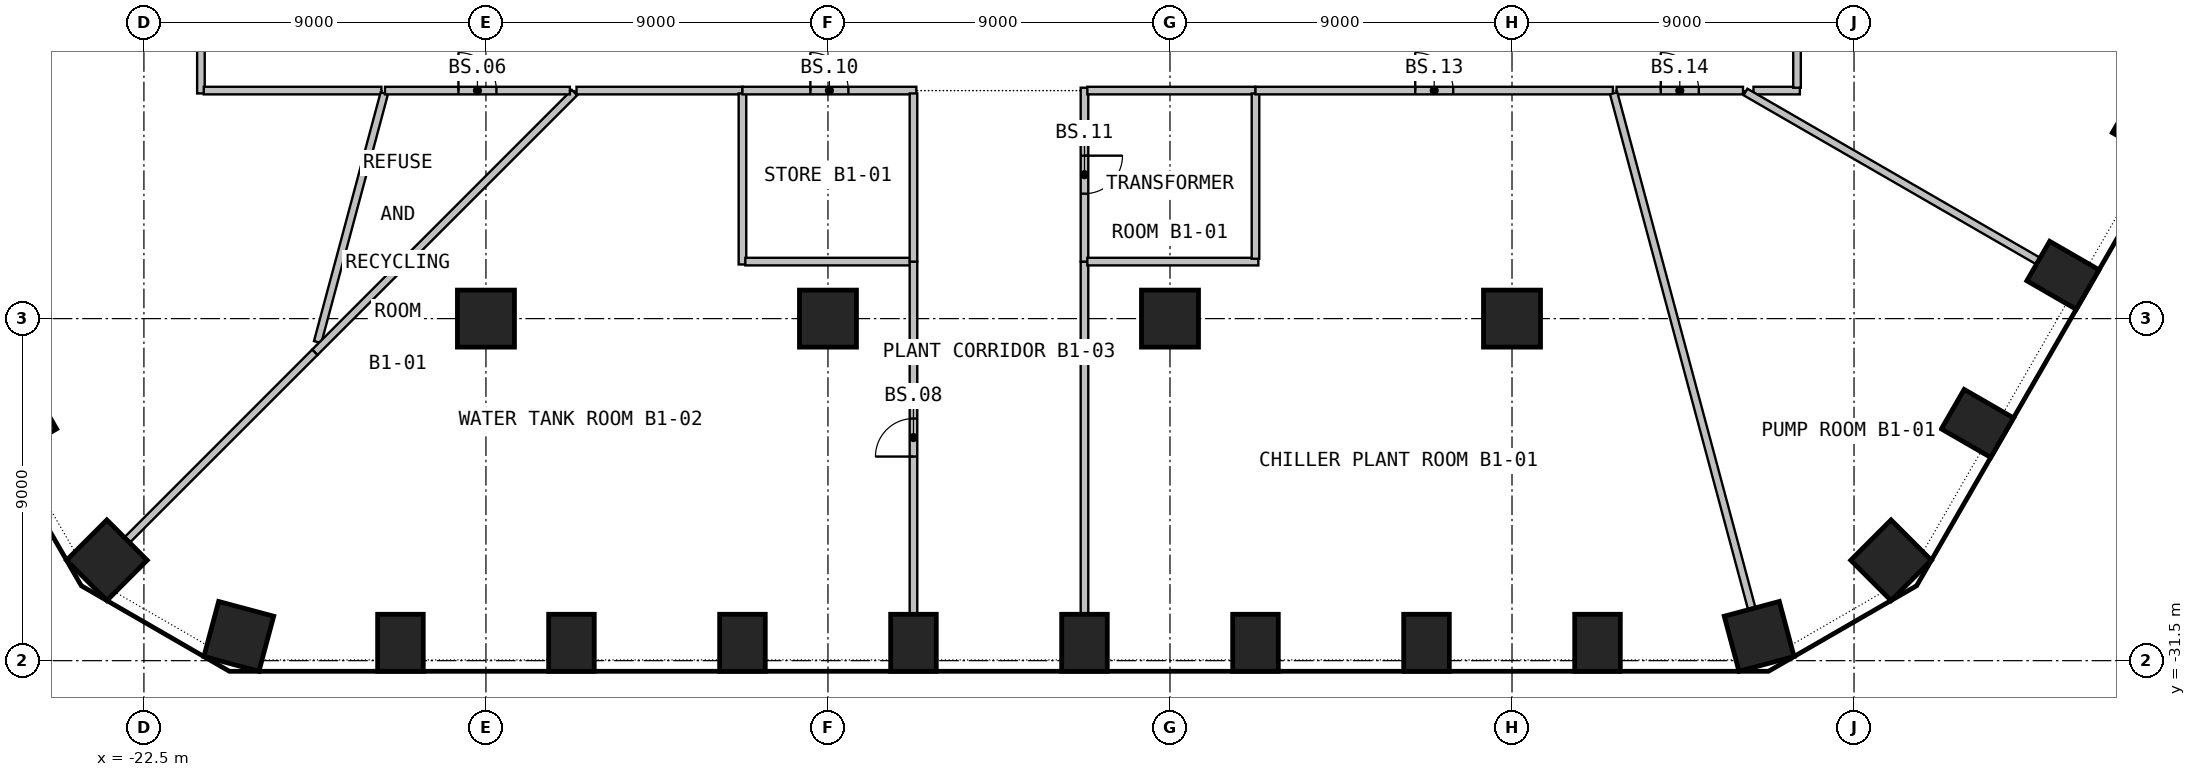
"""IFC4 building model, lengths in metres.
Left out: names, types, materials, properties, quantities, classifications, styles, units other than length and angle.
Written with IfcOpenShell. Run it as: python <this file> out.ifc"""

import sys

from ifc_helpers import new_model, si_unit, direction, frame, frame_2d, origin, origin_2d, place, context, subcontext, project, spatial, rectangle, circle, extrude, element, fill, save


model = new_model("IFC4")
c1 = context("Model", 3, precision=1e-05, world=origin(), true_north=direction((0.0, 1.0)))
c2 = subcontext(c1, "Body", "Model", "MODEL_VIEW")
j1 = project(units=[si_unit("LENGTHUNIT", "METRE"), si_unit("PLANEANGLEUNIT", "RADIAN")], contexts=[c1])
p1 = place(None, origin())
s1 = spatial("IfcSite", under=j1, at=p1, CompositionType="ELEMENT")
p2 = place(p1, origin())
s2 = spatial("IfcBuilding", under=s1, at=p2, CompositionType="ELEMENT")
p3 = place(p2, frame((0.0, 0.0, -5.0)))
s3 = spatial("IfcBuildingStorey", under=s2, at=p3, CompositionType="ELEMENT", Elevation=-5.0)
p4 = place(p3, frame((-20.004, -30.861, 0.0), z_axis=(0.0, 0.0, 1.0), x_axis=(0.965925826289, -0.258819045103, 0.0)))
e1 = element("IfcColumn", 1, at=p4, inside=s3, PredefinedType="COLUMN", context=c2, shape_type="SweptSolid", body=[
    extrude(rectangle(XDim=1.5, YDim=1.5, at=origin_2d()), origin(), (0.0, 0.0, 1.0), 4.55),
])
for number, where, z_axis, x_axis in (
    (2, (-15.75, -31.03, 0.0), (0.0, 0.0, 1.0), (1.0, 0.0, 0.0)),
    (3, (-11.25, -31.03, 0.0), (0.0, 0.0, 1.0), (1.0, 0.0, 0.0)),
    (4, (-6.75, -31.03, 0.0), (0.0, 0.0, 1.0), (1.0, 0.0, 0.0)),
    (5, (-2.25, -31.03, 0.0), (0.0, 0.0, 1.0), (1.0, 0.0, 0.0)),
    (6, (2.25, -31.03, 0.0), (0.0, 0.0, 1.0), (1.0, 0.0, 0.0)),
    (7, (6.75, -31.03, 0.0), (0.0, 0.0, 1.0), (1.0, 0.0, 0.0)),
    (8, (11.25, -31.03, 0.0), (0.0, 0.0, 1.0), (1.0, 0.0, 0.0)),
    (9, (15.75, -31.03, 0.0), (0.0, 0.0, 1.0), (1.0, 0.0, 0.0)),
):
    element("IfcColumn", number, at=place(p3, frame(where, z_axis=z_axis, x_axis=x_axis)), inside=s3, PredefinedType="COLUMN", context=c2, shape_type="SweptSolid", body=[
        extrude(rectangle(XDim=1.2, YDim=1.5, at=origin_2d()), origin(), (0.0, 0.0, 1.0), 4.55),
    ])
for number, where, z_axis, x_axis in (
    (10, (20.004, -30.861, 0.0), (0.0, 0.0, 1.0), (0.966, 0.259, 0.0)),
    (11, (23.475, -28.857, 0.0), (0.0, 0.0, 1.0), (0.707, 0.707, 0.0)),
):
    element("IfcColumn", number, at=place(p3, frame(where, z_axis=z_axis, x_axis=x_axis)), inside=s3, PredefinedType="COLUMN", context=c2, shape_type="SweptSolid", body=[
        extrude(rectangle(XDim=1.5, YDim=1.5, at=origin_2d()), origin(), (0.0, 0.0, 1.0), 4.55),
    ])
for number, where, z_axis, x_axis in (
    (12, (25.748, -25.258, 0.0), (0.0, 0.0, 1.0), (0.5, 0.866, 0.0)),
    (13, (27.998, -21.361, 0.0), (0.0, 0.0, 1.0), (0.5, 0.866, 0.0)),
    (14, (30.248, -17.463, 0.0), (0.0, 0.0, 1.0), (0.5, 0.866, 0.0)),
    (15, (-25.748, -25.258, 0.0), (0.0, 0.0, 1.0), (0.5, -0.866, 0.0)),
):
    element("IfcColumn", number, at=place(p3, frame(where, z_axis=z_axis, x_axis=x_axis)), inside=s3, PredefinedType="COLUMN", context=c2, shape_type="SweptSolid", body=[
        extrude(rectangle(XDim=1.2, YDim=1.5, at=origin_2d()), origin(), (0.0, 0.0, 1.0), 4.55),
    ])
p5 = place(p3, frame((-23.475, -28.857, 0.0), z_axis=(0.0, 0.0, 1.0), x_axis=(0.707106781187, -0.707106781187, 0.0)))
e16 = element("IfcColumn", 16, at=p5, inside=s3, PredefinedType="COLUMN", context=c2, shape_type="SweptSolid", body=[
    extrude(rectangle(XDim=1.5, YDim=1.5, at=origin_2d()), origin(), (0.0, 0.0, 1.0), 4.55),
])
for number, where, z_axis, x_axis in (
    (17, (-13.5, -22.5, 0.0), (0.0, 0.0, 1.0), (1.0, 0.0, 0.0)),
    (18, (-4.5, -22.5, 0.0), (0.0, 0.0, 1.0), (1.0, 0.0, 0.0)),
    (19, (4.5, -22.5, 0.0), (0.0, 0.0, 1.0), (1.0, 0.0, 0.0)),
    (20, (13.5, -22.5, 0.0), (0.0, 0.0, 1.0), (1.0, 0.0, 0.0)),
):
    element("IfcColumn", number, at=place(p3, frame(where, z_axis=z_axis, x_axis=x_axis)), inside=s3, PredefinedType="COLUMN", context=c2, shape_type="SweptSolid", body=[
        extrude(circle(Radius=0.75, at=origin_2d()), origin(), (0.0, 0.0, 1.0), 4.55),
    ])
p6 = place(p3, frame((-18.0, -23.383, 0.0), z_axis=(0.0, 0.0, 1.0), x_axis=(-0.707124289247, -0.707089272693, 0.0)))
e21 = element("IfcWall", 21, at=p6, inside=s3, PredefinedType="PARTITIONING", context=c2, shape_type="SweptSolid", body=[
    extrude(rectangle(XDim=6.972, YDim=0.2, at=frame_2d((3.486, 0.0))), origin(), (0.0, 0.0, 1.0), 4.55),
])
p7 = place(p3, frame((-21.0, -2.325, 0.0), z_axis=(0.0, 0.0, 1.0), x_axis=(0.0, -1.0, 0.0)))
e22 = element("IfcWall", 22, at=p7, inside=s3, PredefinedType="PARTITIONING", context=c2, shape_type="SweptSolid", body=[
    extrude(rectangle(XDim=14.25, YDim=0.2, at=frame_2d((7.125, 0.0))), origin(), (0.0, 0.0, 1.0), 4.55),
])
p8 = place(p7, frame((6.625, 0.0, 0.0)))
e23 = element("IfcOpeningElement", 23, at=p8, cuts=e22, PredefinedType="OPENING", context=c2, shape_type="SweptSolid", body=[
    extrude(rectangle(XDim=1.0, YDim=2.1, at=frame_2d((0.5, 1.05))), frame((0.0, 0.11, 0.0), z_axis=(0.0, -1.0, 0.0), x_axis=(1.0, 0.0, 0.0)), (0.0, 0.0, 1.0), 0.22),
])
p9 = place(p3, frame((-20.925, -16.5, 0.0), z_axis=(0.0, 0.0, 1.0), x_axis=(1.0, 0.0, 0.0)))
e24 = element("IfcWall", 24, at=p9, inside=s3, PredefinedType="PARTITIONING", context=c2, shape_type="SweptSolid", body=[
    extrude(rectangle(XDim=4.674, YDim=0.2, at=frame_2d((2.337, 0.0))), origin(), (0.0, 0.0, 1.0), 4.55),
])
p10 = place(p3, frame((-16.175, -16.573, 0.0), z_axis=(0.0, 0.0, 1.0), x_axis=(-0.25877931008, -0.96593647238, 0.0)))
e25 = element("IfcWall", 25, at=p10, inside=s3, PredefinedType="PARTITIONING", context=c2, shape_type="SweptSolid", body=[
    extrude(rectangle(XDim=6.776, YDim=0.2, at=frame_2d((3.388, 0.0))), origin(), (0.0, 0.0, 1.0), 4.55),
])
p11 = place(p3, frame((-11.17, -16.553, 0.0), z_axis=(0.0, 0.0, 1.0), x_axis=(-0.707106781187, -0.707106781187, 0.0)))
e26 = element("IfcWall", 26, at=p11, inside=s3, PredefinedType="PARTITIONING", context=c2, shape_type="SweptSolid", body=[
    extrude(rectangle(XDim=9.659, YDim=0.2, at=frame_2d((4.83, 0.0))), origin(), (0.0, 0.0, 1.0), 4.55),
])
p12 = place(p3, frame((-16.156, -16.5, 0.0), z_axis=(0.0, 0.0, 1.0), x_axis=(1.0, 0.0, 0.0)))
e27 = element("IfcWall", 27, at=p12, inside=s3, PredefinedType="PARTITIONING", context=c2, shape_type="SweptSolid", body=[
    extrude(rectangle(XDim=4.864, YDim=0.2, at=frame_2d((2.432, 0.0))), origin(), (0.0, 0.0, 1.0), 4.55),
])
p13 = place(p12, frame((1.932, 0.0, 0.0)))
e28 = element("IfcOpeningElement", 28, at=p13, cuts=e27, PredefinedType="OPENING", context=c2, shape_type="SweptSolid", body=[
    extrude(rectangle(XDim=1.0, YDim=2.1, at=frame_2d((0.5, 1.05))), frame((0.0, 0.11, 0.0), z_axis=(0.0, -1.0, 0.0), x_axis=(1.0, 0.0, 0.0)), (0.0, 0.0, 1.0), 0.22),
])
p14 = place(p3, frame((-11.117, -16.5, 0.0), z_axis=(0.0, 0.0, 1.0), x_axis=(1.0, 0.0, 0.0)))
e29 = element("IfcWall", 29, at=p14, inside=s3, PredefinedType="PARTITIONING", context=c2, shape_type="SweptSolid", body=[
    extrude(rectangle(XDim=4.367, YDim=0.2, at=frame_2d((2.184, 0.0))), origin(), (0.0, 0.0, 1.0), 4.55),
])
p15 = place(p3, frame((-6.75, -16.575, 0.0), z_axis=(0.0, 0.0, 1.0), x_axis=(0.0, -1.0, 0.0)))
e30 = element("IfcWall", 30, at=p15, inside=s3, PredefinedType="PARTITIONING", context=c2, shape_type="SweptSolid", body=[
    extrude(rectangle(XDim=4.5, YDim=0.2, at=frame_2d((2.25, 0.0))), origin(), (0.0, 0.0, 1.0), 4.55),
])
p16 = place(p3, frame((-6.675, -21.0, 0.0), z_axis=(0.0, 0.0, 1.0), x_axis=(1.0, 0.0, 0.0)))
e31 = element("IfcWall", 31, at=p16, inside=s3, PredefinedType="PARTITIONING", context=c2, shape_type="SweptSolid", body=[
    extrude(rectangle(XDim=4.35, YDim=0.2, at=frame_2d((2.175, 0.0))), origin(), (0.0, 0.0, 1.0), 4.55),
])
p17 = place(p3, frame((-6.75, -16.5, 0.0), z_axis=(0.0, 0.0, 1.0), x_axis=(1.0, 0.0, 0.0)))
e32 = element("IfcWall", 32, at=p17, inside=s3, PredefinedType="PARTITIONING", context=c2, shape_type="SweptSolid", body=[
    extrude(rectangle(XDim=4.575, YDim=0.2, at=frame_2d((2.288, 0.0))), origin(), (0.0, 0.0, 1.0), 4.55),
])
p18 = place(p17, frame((1.788, 0.0, 0.0)))
e33 = element("IfcOpeningElement", 33, at=p18, cuts=e32, PredefinedType="OPENING", context=c2, shape_type="SweptSolid", body=[
    extrude(rectangle(XDim=1.0, YDim=2.1, at=frame_2d((0.5, 1.05))), frame((0.0, 0.11, 0.0), z_axis=(0.0, -1.0, 0.0), x_axis=(1.0, 0.0, 0.0)), (0.0, 0.0, 1.0), 0.22),
])
p19 = place(p3, frame((-2.25, -30.26, 0.0), z_axis=(0.0, 0.0, 1.0), x_axis=(0.0, 1.0, 0.0)))
e34 = element("IfcWall", 34, at=p19, inside=s3, PredefinedType="PARTITIONING", context=c2, shape_type="SweptSolid", body=[
    extrude(rectangle(XDim=9.26, YDim=0.2, at=frame_2d((4.63, 0.0))), origin(), (0.0, 0.0, 1.0), 4.55),
])
p20 = place(p19, frame((4.13, 0.0, 0.0)))
e35 = element("IfcOpeningElement", 35, at=p20, cuts=e34, PredefinedType="OPENING", context=c2, shape_type="SweptSolid", body=[
    extrude(rectangle(XDim=1.0, YDim=2.1, at=frame_2d((0.5, 1.05))), frame((0.0, 0.11, 0.0), z_axis=(0.0, -1.0, 0.0), x_axis=(1.0, 0.0, 0.0)), (0.0, 0.0, 1.0), 0.22),
])
p21 = place(p3, frame((-2.25, -21.0, 0.0), z_axis=(0.0, 0.0, 1.0), x_axis=(0.0, 1.0, 0.0)))
e36 = element("IfcWall", 36, at=p21, inside=s3, PredefinedType="PARTITIONING", context=c2, shape_type="SweptSolid", body=[
    extrude(rectangle(XDim=4.425, YDim=0.2, at=frame_2d((2.212, 0.0))), origin(), (0.0, 0.0, 1.0), 4.55),
])
p22 = place(p3, frame((2.25, -21.0, 0.0), z_axis=(0.0, 0.0, 1.0), x_axis=(0.0, -1.0, 0.0)))
e37 = element("IfcWall", 37, at=p22, inside=s3, PredefinedType="PARTITIONING", context=c2, shape_type="SweptSolid", body=[
    extrude(rectangle(XDim=9.26, YDim=0.2, at=frame_2d((4.63, 0.0))), origin(), (0.0, 0.0, 1.0), 4.55),
])
p23 = place(p3, frame((2.25, -16.425, 0.0), z_axis=(0.0, 0.0, 1.0), x_axis=(0.0, -1.0, 0.0)))
e38 = element("IfcWall", 38, at=p23, inside=s3, PredefinedType="PARTITIONING", context=c2, shape_type="SweptSolid", body=[
    extrude(rectangle(XDim=4.575, YDim=0.2, at=frame_2d((2.288, 0.0))), origin(), (0.0, 0.0, 1.0), 4.55),
])
p24 = place(p23, frame((1.788, 0.0, 0.0)))
e39 = element("IfcOpeningElement", 39, at=p24, cuts=e38, PredefinedType="OPENING", context=c2, shape_type="SweptSolid", body=[
    extrude(rectangle(XDim=1.0, YDim=2.1, at=frame_2d((0.5, 1.05))), frame((0.0, 0.11, 0.0), z_axis=(0.0, -1.0, 0.0), x_axis=(1.0, 0.0, 0.0)), (0.0, 0.0, 1.0), 0.22),
])
p25 = place(p3, frame((6.825, -21.0, 0.0), z_axis=(0.0, 0.0, 1.0), x_axis=(-1.0, 0.0, 0.0)))
e40 = element("IfcWall", 40, at=p25, inside=s3, PredefinedType="PARTITIONING", context=c2, shape_type="SweptSolid", body=[
    extrude(rectangle(XDim=4.5, YDim=0.2, at=frame_2d((2.25, 0.0))), origin(), (0.0, 0.0, 1.0), 4.55),
])
p26 = place(p3, frame((2.325, -16.5, 0.0), z_axis=(0.0, 0.0, 1.0), x_axis=(1.0, 0.0, 0.0)))
e41 = element("IfcWall", 41, at=p26, inside=s3, PredefinedType="PARTITIONING", context=c2, shape_type="SweptSolid", body=[
    extrude(rectangle(XDim=4.425, YDim=0.2, at=frame_2d((2.212, 0.0))), origin(), (0.0, 0.0, 1.0), 4.55),
])
p27 = place(p3, frame((6.75, -16.575, 0.0), z_axis=(0.0, 0.0, 1.0), x_axis=(0.0, -1.0, 0.0)))
e42 = element("IfcWall", 42, at=p27, inside=s3, PredefinedType="PARTITIONING", context=c2, shape_type="SweptSolid", body=[
    extrude(rectangle(XDim=4.35, YDim=0.2, at=frame_2d((2.175, 0.0))), origin(), (0.0, 0.0, 1.0), 4.55),
])
p28 = place(p3, frame((6.75, -16.5, 0.0), z_axis=(0.0, 0.0, 1.0), x_axis=(1.0, 0.0, 0.0)))
e43 = element("IfcWall", 43, at=p28, inside=s3, PredefinedType="PARTITIONING", context=c2, shape_type="SweptSolid", body=[
    extrude(rectangle(XDim=9.406, YDim=0.2, at=frame_2d((4.703, 0.0))), origin(), (0.0, 0.0, 1.0), 4.55),
])
p29 = place(p28, frame((4.203, 0.0, 0.0)))
e44 = element("IfcOpeningElement", 44, at=p29, cuts=e43, PredefinedType="OPENING", context=c2, shape_type="SweptSolid", body=[
    extrude(rectangle(XDim=1.0, YDim=2.1, at=frame_2d((0.5, 1.05))), frame((0.0, 0.11, 0.0), z_axis=(0.0, -1.0, 0.0), x_axis=(1.0, 0.0, 0.0)), (0.0, 0.0, 1.0), 0.22),
])
p30 = place(p3, frame((16.251, -16.5, 0.0), z_axis=(0.0, 0.0, 1.0), x_axis=(1.0, 0.0, 0.0)))
e45 = element("IfcWall", 45, at=p30, inside=s3, PredefinedType="PARTITIONING", context=c2, shape_type="SweptSolid", body=[
    extrude(rectangle(XDim=3.328, YDim=0.2, at=frame_2d((1.664, 0.0))), origin(), (0.0, 0.0, 1.0), 4.55),
])
p31 = place(p30, frame((1.164, 0.0, 0.0)))
e46 = element("IfcOpeningElement", 46, at=p31, cuts=e45, PredefinedType="OPENING", context=c2, shape_type="SweptSolid", body=[
    extrude(rectangle(XDim=1.0, YDim=2.1, at=frame_2d((0.5, 1.05))), frame((0.0, 0.11, 0.0), z_axis=(0.0, -1.0, 0.0), x_axis=(1.0, 0.0, 0.0)), (0.0, 0.0, 1.0), 0.22),
])
p32 = place(p3, frame((16.175, -16.573, 0.0), z_axis=(0.0, 0.0, 1.0), x_axis=(0.258838193525, -0.965920695281, 0.0)))
e47 = element("IfcWall", 47, at=p32, inside=s3, PredefinedType="PARTITIONING", context=c2, shape_type="SweptSolid", body=[
    extrude(rectangle(XDim=14.023, YDim=0.2, at=frame_2d((7.011, 0.0))), origin(), (0.0, 0.0, 1.0), 4.55),
])
p33 = place(p3, frame((19.854, -16.5, 0.0), z_axis=(0.0, 0.0, 1.0), x_axis=(1.0, 0.0, 0.0)))
e48 = element("IfcWall", 48, at=p33, inside=s3, PredefinedType="PARTITIONING", context=c2, shape_type="SweptSolid", body=[
    extrude(rectangle(XDim=1.221, YDim=0.2, at=frame_2d((0.61, 0.0))), origin(), (0.0, 0.0, 1.0), 4.55),
])
p34 = place(p3, frame((19.644, -16.538, 0.0), z_axis=(0.0, 0.0, 1.0), x_axis=(0.866000072607, -0.50004387232, 0.0)))
e49 = element("IfcWall", 49, at=p34, inside=s3, PredefinedType="PARTITIONING", context=c2, shape_type="SweptSolid", body=[
    extrude(rectangle(XDim=8.876, YDim=0.2, at=frame_2d((4.438, 0.0))), origin(), (0.0, 0.0, 1.0), 4.55),
])
p35 = place(p3, frame((21.0, -16.425, 0.0), z_axis=(0.0, 0.0, 1.0), x_axis=(0.0, 1.0, 0.0)))
e50 = element("IfcWall", 50, at=p35, inside=s3, PredefinedType="PARTITIONING", context=c2, shape_type="SweptSolid", body=[
    extrude(rectangle(XDim=14.25, YDim=0.2, at=frame_2d((7.125, 0.0))), origin(), (0.0, 0.0, 1.0), 4.55),
])
p36 = place(p35, frame((6.625, 0.0, 0.0)))
e51 = element("IfcOpeningElement", 51, at=p36, cuts=e50, PredefinedType="OPENING", context=c2, shape_type="SweptSolid", body=[
    extrude(rectangle(XDim=1.0, YDim=2.1, at=frame_2d((0.5, 1.05))), frame((0.0, 0.11, 0.0), z_axis=(0.0, -1.0, 0.0), x_axis=(1.0, 0.0, 0.0)), (0.0, 0.0, 1.0), 0.22),
])
p37 = place(p13, origin())
e52 = element("IfcDoor", 52, at=p37, inside=s3, OperationType="SINGLE_SWING_RIGHT", PredefinedType="DOOR", context=c2, shape_type="SweptSolid", body=[
    extrude(rectangle(XDim=1.0, YDim=2.1, at=frame_2d((0.5, 1.05))), frame((0.0, 0.025, 0.0), z_axis=(0.0, -1.0, 0.0), x_axis=(1.0, 0.0, 0.0)), (0.0, 0.0, 1.0), 0.05),
])
fill(e28, e52)
p38 = place(p20, origin())
e53 = element("IfcDoor", 53, at=p38, inside=s3, OperationType="SINGLE_SWING_LEFT", PredefinedType="DOOR", context=c2, shape_type="SweptSolid", body=[
    extrude(rectangle(XDim=1.0, YDim=2.1, at=frame_2d((0.5, 1.05))), frame((0.0, 0.025, 0.0), z_axis=(0.0, -1.0, 0.0), x_axis=(1.0, 0.0, 0.0)), (0.0, 0.0, 1.0), 0.05),
])
fill(e35, e53)
p39 = place(p18, origin())
e54 = element("IfcDoor", 54, at=p39, inside=s3, OperationType="SINGLE_SWING_LEFT", PredefinedType="DOOR", context=c2, shape_type="SweptSolid", body=[
    extrude(rectangle(XDim=1.0, YDim=2.1, at=frame_2d((0.5, 1.05))), frame((0.0, 0.025, 0.0), z_axis=(0.0, -1.0, 0.0), x_axis=(1.0, 0.0, 0.0)), (0.0, 0.0, 1.0), 0.05),
])
fill(e33, e54)
p40 = place(p24, origin())
e55 = element("IfcDoor", 55, at=p40, inside=s3, OperationType="SINGLE_SWING_RIGHT", PredefinedType="DOOR", context=c2, shape_type="SweptSolid", body=[
    extrude(rectangle(XDim=1.0, YDim=2.1, at=frame_2d((0.5, 1.05))), frame((0.0, 0.025, 0.0), z_axis=(0.0, -1.0, 0.0), x_axis=(1.0, 0.0, 0.0)), (0.0, 0.0, 1.0), 0.05),
])
fill(e39, e55)
p41 = place(p29, origin())
e56 = element("IfcDoor", 56, at=p41, inside=s3, OperationType="SINGLE_SWING_LEFT", PredefinedType="DOOR", context=c2, shape_type="SweptSolid", body=[
    extrude(rectangle(XDim=1.0, YDim=2.1, at=frame_2d((0.5, 1.05))), frame((0.0, 0.025, 0.0), z_axis=(0.0, -1.0, 0.0), x_axis=(1.0, 0.0, 0.0)), (0.0, 0.0, 1.0), 0.05),
])
fill(e44, e56)
p42 = place(p31, origin())
e57 = element("IfcDoor", 57, at=p42, inside=s3, OperationType="SINGLE_SWING_RIGHT", PredefinedType="DOOR", context=c2, shape_type="SweptSolid", body=[
    extrude(rectangle(XDim=1.0, YDim=2.1, at=frame_2d((0.5, 1.05))), frame((0.0, 0.025, 0.0), z_axis=(0.0, -1.0, 0.0), x_axis=(1.0, 0.0, 0.0)), (0.0, 0.0, 1.0), 0.05),
])
fill(e46, e57)
save(model, sys.argv[1])
